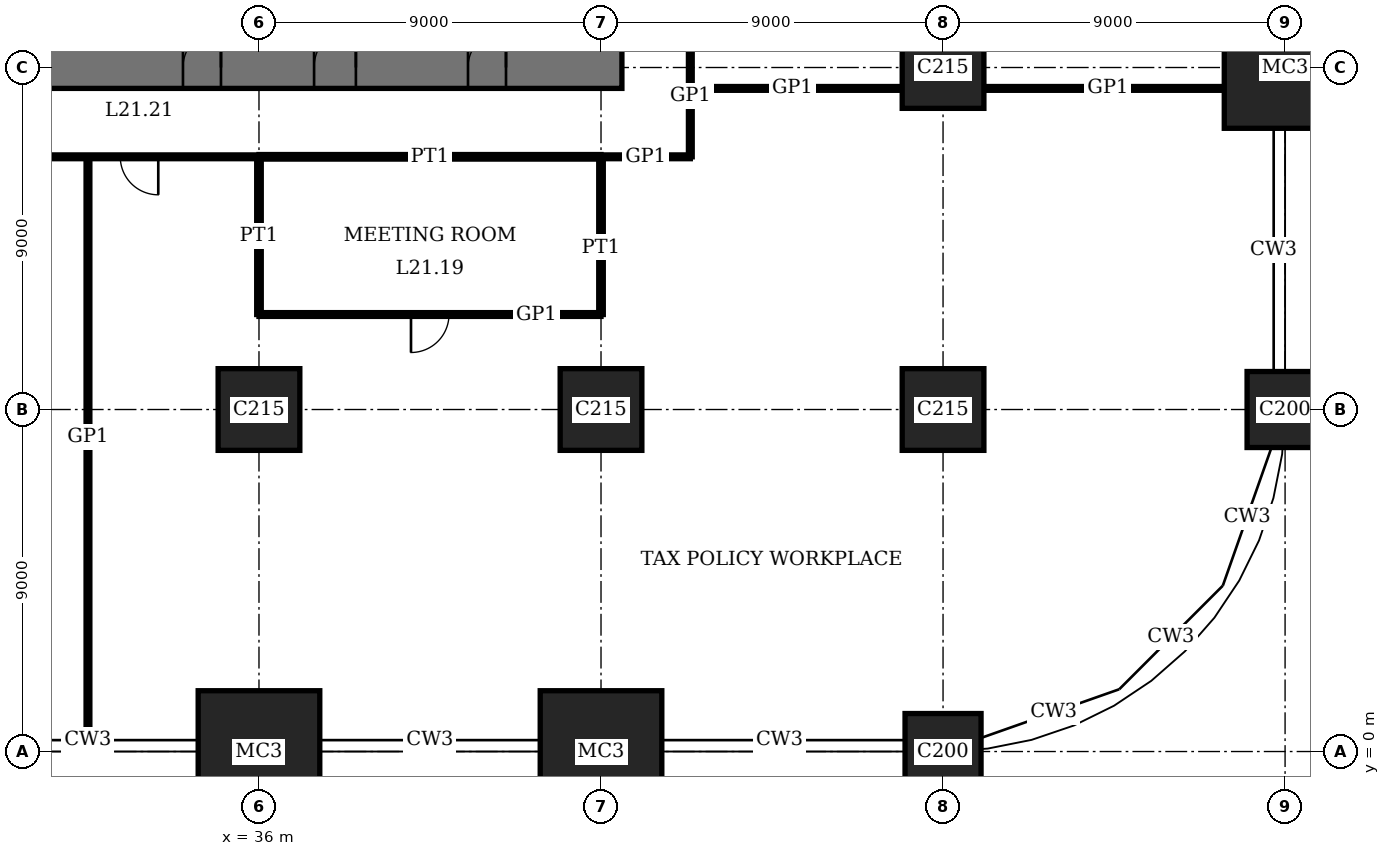
"""IFC4 building model, lengths in metres.
Left out: names, types, materials, properties, quantities, classifications, styles, units other than length and angle.
Written with IfcOpenShell. Run it as: python <this file> out.ifc"""

import sys

from ifc_helpers import new_model, si_unit, direction, frame, frame_2d, origin, origin_2d, place, context, subcontext, project, spatial, rectangle, extrude, element, fill, save


model = new_model("IFC4")
c1 = context("Model", 3, precision=1e-05, world=origin(), true_north=direction((0.0, 1.0)))
c2 = subcontext(c1, "Body", "Model", "MODEL_VIEW")
j1 = project(units=[si_unit("LENGTHUNIT", "METRE"), si_unit("PLANEANGLEUNIT", "RADIAN")], contexts=[c1])
p1 = place(None, origin())
s1 = spatial("IfcSite", under=j1, at=p1, CompositionType="ELEMENT")
p2 = place(p1, origin())
s2 = spatial("IfcBuilding", under=s1, at=p2, CompositionType="ELEMENT")
p3 = place(p2, frame((0.0, 0.0, 89.0)))
s3 = spatial("IfcBuildingStorey", under=s2, at=p3, CompositionType="ELEMENT", Elevation=89.0)
p4 = place(p3, frame((36.0, 0.0, 0.0), z_axis=(0.0, 0.0, 1.0), x_axis=(1.0, 0.0, 0.0)))
e1 = element("IfcColumn", 1, at=p4, inside=s3, PredefinedType="COLUMN", context=c2, shape_type="SweptSolid", body=[
    extrude(rectangle(XDim=3.2, YDim=3.2, at=origin_2d()), origin(), (0.0, 0.0, 1.0), 4.0),
])
p5 = place(p3, frame((36.0, 9.0, 0.0), z_axis=(0.0, 0.0, 1.0), x_axis=(1.0, 0.0, 0.0)))
e2 = element("IfcColumn", 2, at=p5, inside=s3, PredefinedType="COLUMN", context=c2, shape_type="SweptSolid", body=[
    extrude(rectangle(XDim=2.15, YDim=2.15, at=origin_2d()), origin(), (0.0, 0.0, 1.0), 4.0),
])
p6 = place(p3, frame((45.0, 0.0, 0.0), z_axis=(0.0, 0.0, 1.0), x_axis=(1.0, 0.0, 0.0)))
e3 = element("IfcColumn", 3, at=p6, inside=s3, PredefinedType="COLUMN", context=c2, shape_type="SweptSolid", body=[
    extrude(rectangle(XDim=3.2, YDim=3.2, at=origin_2d()), origin(), (0.0, 0.0, 1.0), 4.0),
])
p7 = place(p3, frame((45.0, 9.0, 0.0), z_axis=(0.0, 0.0, 1.0), x_axis=(1.0, 0.0, 0.0)))
e4 = element("IfcColumn", 4, at=p7, inside=s3, PredefinedType="COLUMN", context=c2, shape_type="SweptSolid", body=[
    extrude(rectangle(XDim=2.15, YDim=2.15, at=origin_2d()), origin(), (0.0, 0.0, 1.0), 4.0),
])
p8 = place(p3, frame((54.0, 0.0, 0.0), z_axis=(0.0, 0.0, 1.0), x_axis=(1.0, 0.0, 0.0)))
e5 = element("IfcColumn", 5, at=p8, inside=s3, PredefinedType="COLUMN", context=c2, shape_type="SweptSolid", body=[
    extrude(rectangle(XDim=2.0, YDim=2.0, at=origin_2d()), origin(), (0.0, 0.0, 1.0), 4.0),
])
for number, where, z_axis, x_axis in (
    (6, (54.0, 9.0, 0.0), (0.0, 0.0, 1.0), (1.0, 0.0, 0.0)),
    (7, (54.0, 18.0, 0.0), (0.0, 0.0, 1.0), (1.0, 0.0, 0.0)),
):
    element("IfcColumn", number, at=place(p3, frame(where, z_axis=z_axis, x_axis=x_axis)), inside=s3, PredefinedType="COLUMN", context=c2, shape_type="SweptSolid", body=[
        extrude(rectangle(XDim=2.15, YDim=2.15, at=origin_2d()), origin(), (0.0, 0.0, 1.0), 4.0),
    ])
p9 = place(p3, frame((63.0, 9.0, 0.0), z_axis=(0.0, 0.0, 1.0), x_axis=(1.0, 0.0, 0.0)))
e8 = element("IfcColumn", 8, at=p9, inside=s3, PredefinedType="COLUMN", context=c2, shape_type="SweptSolid", body=[
    extrude(rectangle(XDim=2.0, YDim=2.0, at=origin_2d()), origin(), (0.0, 0.0, 1.0), 4.0),
])
p10 = place(p3, frame((63.0, 18.0, 0.0), z_axis=(0.0, 0.0, 1.0), x_axis=(1.0, 0.0, 0.0)))
e9 = element("IfcColumn", 9, at=p10, inside=s3, PredefinedType="COLUMN", context=c2, shape_type="SweptSolid", body=[
    extrude(rectangle(XDim=3.2, YDim=3.2, at=origin_2d()), origin(), (0.0, 0.0, 1.0), 4.0),
])
p11 = place(p3, frame((17.45, 18.0, 0.0), z_axis=(0.0, 0.0, 1.0), x_axis=(1.0, 0.0, 0.0)))
e10 = element("IfcWall", 10, at=p11, inside=s3, PredefinedType="SHEAR", context=c2, shape_type="SweptSolid", body=[
    extrude(rectangle(XDim=28.1, YDim=1.1, at=frame_2d((14.05, 0.0))), origin(), (0.0, 0.0, 1.0), 4.0),
])
p12 = place(p11, frame((11.55, 0.0, 0.0)))
e11 = element("IfcOpeningElement", 11, at=p12, cuts=e10, PredefinedType="OPENING", context=c2, shape_type="SweptSolid", body=[
    extrude(rectangle(XDim=1.0, YDim=2.4, at=frame_2d((0.5, 1.2))), frame((0.0, 0.56, 0.0), z_axis=(0.0, -1.0, 0.0), x_axis=(1.0, 0.0, 0.0)), (0.0, 0.0, 1.0), 1.12),
])
p13 = place(p11, frame((16.55, 0.0, 0.0)))
e12 = element("IfcOpeningElement", 12, at=p13, cuts=e10, PredefinedType="OPENING", context=c2, shape_type="SweptSolid", body=[
    extrude(rectangle(XDim=1.0, YDim=2.4, at=frame_2d((0.5, 1.2))), frame((0.0, 0.56, 0.0), z_axis=(0.0, -1.0, 0.0), x_axis=(1.0, 0.0, 0.0)), (0.0, 0.0, 1.0), 1.12),
])
p14 = place(p11, frame((20.0, 0.0, 0.0)))
e13 = element("IfcOpeningElement", 13, at=p14, cuts=e10, PredefinedType="OPENING", context=c2, shape_type="SweptSolid", body=[
    extrude(rectangle(XDim=1.1, YDim=2.4, at=frame_2d((0.55, 1.2))), frame((0.0, 0.56, 0.0), z_axis=(0.0, -1.0, 0.0), x_axis=(1.0, 0.0, 0.0)), (0.0, 0.0, 1.0), 1.12),
])
p15 = place(p11, frame((24.05, 0.0, 0.0)))
e14 = element("IfcOpeningElement", 14, at=p15, cuts=e10, PredefinedType="OPENING", context=c2, shape_type="SweptSolid", body=[
    extrude(rectangle(XDim=1.0, YDim=2.4, at=frame_2d((0.5, 1.2))), frame((0.0, 0.56, 0.0), z_axis=(0.0, -1.0, 0.0), x_axis=(1.0, 0.0, 0.0)), (0.0, 0.0, 1.0), 1.12),
])
p16 = place(p3, frame((36.0, 11.5, 0.0), z_axis=(0.0, 0.0, 1.0), x_axis=(1.0, 0.0, 0.0)))
e15 = element("IfcWall", 15, at=p16, inside=s3, PredefinedType="PARTITIONING", context=c2, shape_type="SweptSolid", body=[
    extrude(rectangle(XDim=9.0, YDim=0.1, at=frame_2d((4.5, 0.0))), origin(), (0.0, 0.0, 1.0), 3.75),
])
p17 = place(p16, frame((4.0, 0.0, 0.0)))
e16 = element("IfcOpeningElement", 16, at=p17, cuts=e15, PredefinedType="OPENING", context=c2, shape_type="SweptSolid", body=[
    extrude(rectangle(XDim=1.0, YDim=2.4, at=frame_2d((0.5, 1.2))), frame((0.0, 0.06, 0.0), z_axis=(0.0, -1.0, 0.0), x_axis=(1.0, 0.0, 0.0)), (0.0, 0.0, 1.0), 0.12),
])
p18 = place(p3, frame((36.0, 15.65, 0.0), z_axis=(0.0, 0.0, 1.0), x_axis=(1.0, 0.0, 0.0)))
e17 = element("IfcWall", 17, at=p18, inside=s3, PredefinedType="PARTITIONING", context=c2, shape_type="SweptSolid", body=[
    extrude(rectangle(XDim=9.0, YDim=0.12, at=frame_2d((4.5, 0.0))), origin(), (0.0, 0.0, 1.0), 3.75),
])
p19 = place(p3, frame((27.0, 15.65, 0.0), z_axis=(0.0, 0.0, 1.0), x_axis=(1.0, 0.0, 0.0)))
e18 = element("IfcWall", 18, at=p19, inside=s3, PredefinedType="PARTITIONING", context=c2, shape_type="SweptSolid", body=[
    extrude(rectangle(XDim=9.0, YDim=0.1, at=frame_2d((4.5, 0.0))), origin(), (0.0, 0.0, 1.0), 3.75),
])
p20 = place(p19, frame((5.35, 0.0, 0.0)))
e19 = element("IfcOpeningElement", 19, at=p20, cuts=e18, PredefinedType="OPENING", context=c2, shape_type="SweptSolid", body=[
    extrude(rectangle(XDim=1.0, YDim=2.4, at=frame_2d((0.5, 1.2))), frame((0.0, 0.06, 0.0), z_axis=(0.0, -1.0, 0.0), x_axis=(1.0, 0.0, 0.0)), (0.0, 0.0, 1.0), 0.12),
])
p21 = place(p3, frame((45.0, 15.65, 0.0), z_axis=(0.0, 0.0, 1.0), x_axis=(1.0, 0.0, 0.0)))
e20 = element("IfcWall", 20, at=p21, inside=s3, PredefinedType="PARTITIONING", context=c2, shape_type="SweptSolid", body=[
    extrude(rectangle(XDim=2.35, YDim=0.1, at=frame_2d((1.175, 0.0))), origin(), (0.0, 0.0, 1.0), 3.75),
])
p22 = place(p3, frame((47.35, 17.45, 0.0), z_axis=(0.0, 0.0, 1.0), x_axis=(1.0, 0.0, 0.0)))
e21 = element("IfcWall", 21, at=p22, inside=s3, PredefinedType="PARTITIONING", context=c2, shape_type="SweptSolid", body=[
    extrude(rectangle(XDim=5.575, YDim=0.1, at=frame_2d((2.788, 0.0))), origin(), (0.0, 0.0, 1.0), 3.75),
])
p23 = place(p3, frame((55.075, 17.45, 0.0), z_axis=(0.0, 0.0, 1.0), x_axis=(1.0, 0.0, 0.0)))
e22 = element("IfcWall", 22, at=p23, inside=s3, PredefinedType="PARTITIONING", context=c2, shape_type="SweptSolid", body=[
    extrude(rectangle(XDim=6.325, YDim=0.1, at=frame_2d((3.163, 0.0))), origin(), (0.0, 0.0, 1.0), 3.75),
])
p24 = place(p3, frame((31.5, 0.31, 0.0), z_axis=(0.0, 0.0, 1.0), x_axis=(0.0, 1.0, 0.0)))
e23 = element("IfcWall", 23, at=p24, inside=s3, PredefinedType="PARTITIONING", context=c2, shape_type="SweptSolid", body=[
    extrude(rectangle(XDim=15.34, YDim=0.1, at=frame_2d((7.67, 0.0))), origin(), (0.0, 0.0, 1.0), 3.75),
])
for number, where, z_axis, x_axis in (
    (24, (36.0, 11.5, 0.0), (0.0, 0.0, 1.0), (0.0, 1.0, 0.0)),
    (25, (45.0, 11.5, 0.0), (0.0, 0.0, 1.0), (0.0, 1.0, 0.0)),
):
    element("IfcWall", number, at=place(p3, frame(where, z_axis=z_axis, x_axis=x_axis)), inside=s3, PredefinedType="PARTITIONING", context=c2, shape_type="SweptSolid", body=[
        extrude(rectangle(XDim=4.15, YDim=0.12, at=frame_2d((2.075, 0.0))), origin(), (0.0, 0.0, 1.0), 3.05),
    ])
p25 = place(p3, frame((47.35, 15.65, 0.0), z_axis=(0.0, 0.0, 1.0), x_axis=(0.0, 1.0, 0.0)))
e26 = element("IfcWall", 26, at=p25, inside=s3, PredefinedType="PARTITIONING", context=c2, shape_type="SweptSolid", body=[
    extrude(rectangle(XDim=6.85, YDim=0.1, at=frame_2d((3.425, 0.0))), origin(), (0.0, 0.0, 1.0), 3.75),
])
p26 = place(p25, frame((2.925, 0.0, 0.0)))
e27 = element("IfcOpeningElement", 27, at=p26, cuts=e26, PredefinedType="OPENING", context=c2, shape_type="SweptSolid", body=[
    extrude(rectangle(XDim=1.0, YDim=2.4, at=frame_2d((0.5, 1.2))), frame((0.0, 0.06, 0.0), z_axis=(0.0, -1.0, 0.0), x_axis=(1.0, 0.0, 0.0)), (0.0, 0.0, 1.0), 0.12),
])
p27 = place(p13, origin())
e28 = element("IfcDoor", 28, at=p27, inside=s3, OperationType="SINGLE_SWING_LEFT", PredefinedType="DOOR", context=c2, shape_type="SweptSolid", body=[
    extrude(rectangle(XDim=1.0, YDim=2.4, at=frame_2d((0.5, 1.2))), frame((0.0, 0.025, 0.0), z_axis=(0.0, -1.0, 0.0), x_axis=(1.0, 0.0, 0.0)), (0.0, 0.0, 1.0), 0.05),
    extrude(rectangle(XDim=0.04, YDim=2.4, at=frame_2d((0.02, 1.2))), frame((0.0, 0.4, 0.0), z_axis=(0.0, -1.0, 0.0), x_axis=(1.0, 0.0, 0.0)), (0.0, 0.0, 1.0), 0.8),
    extrude(rectangle(XDim=0.04, YDim=2.4, at=frame_2d((0.98, 1.2))), frame((0.0, 0.4, 0.0), z_axis=(0.0, -1.0, 0.0), x_axis=(1.0, 0.0, 0.0)), (0.0, 0.0, 1.0), 0.8),
    extrude(rectangle(XDim=1.0, YDim=0.04, at=frame_2d((0.5, 2.38))), frame((0.0, 0.4, 0.0), z_axis=(0.0, -1.0, 0.0), x_axis=(1.0, 0.0, 0.0)), (0.0, 0.0, 1.0), 0.8),
])
fill(e12, e28)
p28 = place(p14, origin())
e29 = element("IfcDoor", 29, at=p28, inside=s3, OperationType="SINGLE_SWING_LEFT", PredefinedType="DOOR", context=c2, shape_type="SweptSolid", body=[
    extrude(rectangle(XDim=1.1, YDim=2.4, at=frame_2d((0.55, 1.2))), frame((0.0, 0.025, 0.0), z_axis=(0.0, -1.0, 0.0), x_axis=(1.0, 0.0, 0.0)), (0.0, 0.0, 1.0), 0.05),
    extrude(rectangle(XDim=0.04, YDim=2.4, at=frame_2d((0.02, 1.2))), frame((0.0, 0.44, 0.0), z_axis=(0.0, -1.0, 0.0), x_axis=(1.0, 0.0, 0.0)), (0.0, 0.0, 1.0), 0.88),
    extrude(rectangle(XDim=0.04, YDim=2.4, at=frame_2d((1.08, 1.2))), frame((0.0, 0.44, 0.0), z_axis=(0.0, -1.0, 0.0), x_axis=(1.0, 0.0, 0.0)), (0.0, 0.0, 1.0), 0.88),
    extrude(rectangle(XDim=1.1, YDim=0.04, at=frame_2d((0.55, 2.38))), frame((0.0, 0.44, 0.0), z_axis=(0.0, -1.0, 0.0), x_axis=(1.0, 0.0, 0.0)), (0.0, 0.0, 1.0), 0.88),
])
fill(e13, e29)
p29 = place(p15, origin())
e30 = element("IfcDoor", 30, at=p29, inside=s3, OperationType="SINGLE_SWING_LEFT", PredefinedType="DOOR", context=c2, shape_type="SweptSolid", body=[
    extrude(rectangle(XDim=1.0, YDim=2.4, at=frame_2d((0.5, 1.2))), frame((0.0, 0.025, 0.0), z_axis=(0.0, -1.0, 0.0), x_axis=(1.0, 0.0, 0.0)), (0.0, 0.0, 1.0), 0.05),
    extrude(rectangle(XDim=0.04, YDim=2.4, at=frame_2d((0.02, 1.2))), frame((0.0, 0.4, 0.0), z_axis=(0.0, -1.0, 0.0), x_axis=(1.0, 0.0, 0.0)), (0.0, 0.0, 1.0), 0.8),
    extrude(rectangle(XDim=0.04, YDim=2.4, at=frame_2d((0.98, 1.2))), frame((0.0, 0.4, 0.0), z_axis=(0.0, -1.0, 0.0), x_axis=(1.0, 0.0, 0.0)), (0.0, 0.0, 1.0), 0.8),
    extrude(rectangle(XDim=1.0, YDim=0.04, at=frame_2d((0.5, 2.38))), frame((0.0, 0.4, 0.0), z_axis=(0.0, -1.0, 0.0), x_axis=(1.0, 0.0, 0.0)), (0.0, 0.0, 1.0), 0.8),
])
fill(e14, e30)
p30 = place(p17, origin())
e31 = element("IfcDoor", 31, at=p30, inside=s3, OperationType="SINGLE_SWING_LEFT", PredefinedType="DOOR", context=c2, shape_type="SweptSolid", body=[
    extrude(rectangle(XDim=1.0, YDim=2.4, at=frame_2d((0.5, 1.2))), frame((0.0, 0.02, 0.0), z_axis=(0.0, -1.0, 0.0), x_axis=(1.0, 0.0, 0.0)), (0.0, 0.0, 1.0), 0.04),
])
fill(e16, e31)
p31 = place(p20, origin())
e32 = element("IfcDoor", 32, at=p31, inside=s3, OperationType="SINGLE_SWING_RIGHT", PredefinedType="DOOR", context=c2, shape_type="SweptSolid", body=[
    extrude(rectangle(XDim=1.0, YDim=2.4, at=frame_2d((0.5, 1.2))), frame((0.0, 0.02, 0.0), z_axis=(0.0, -1.0, 0.0), x_axis=(1.0, 0.0, 0.0)), (0.0, 0.0, 1.0), 0.04),
])
fill(e19, e32)
save(model, sys.argv[1])
